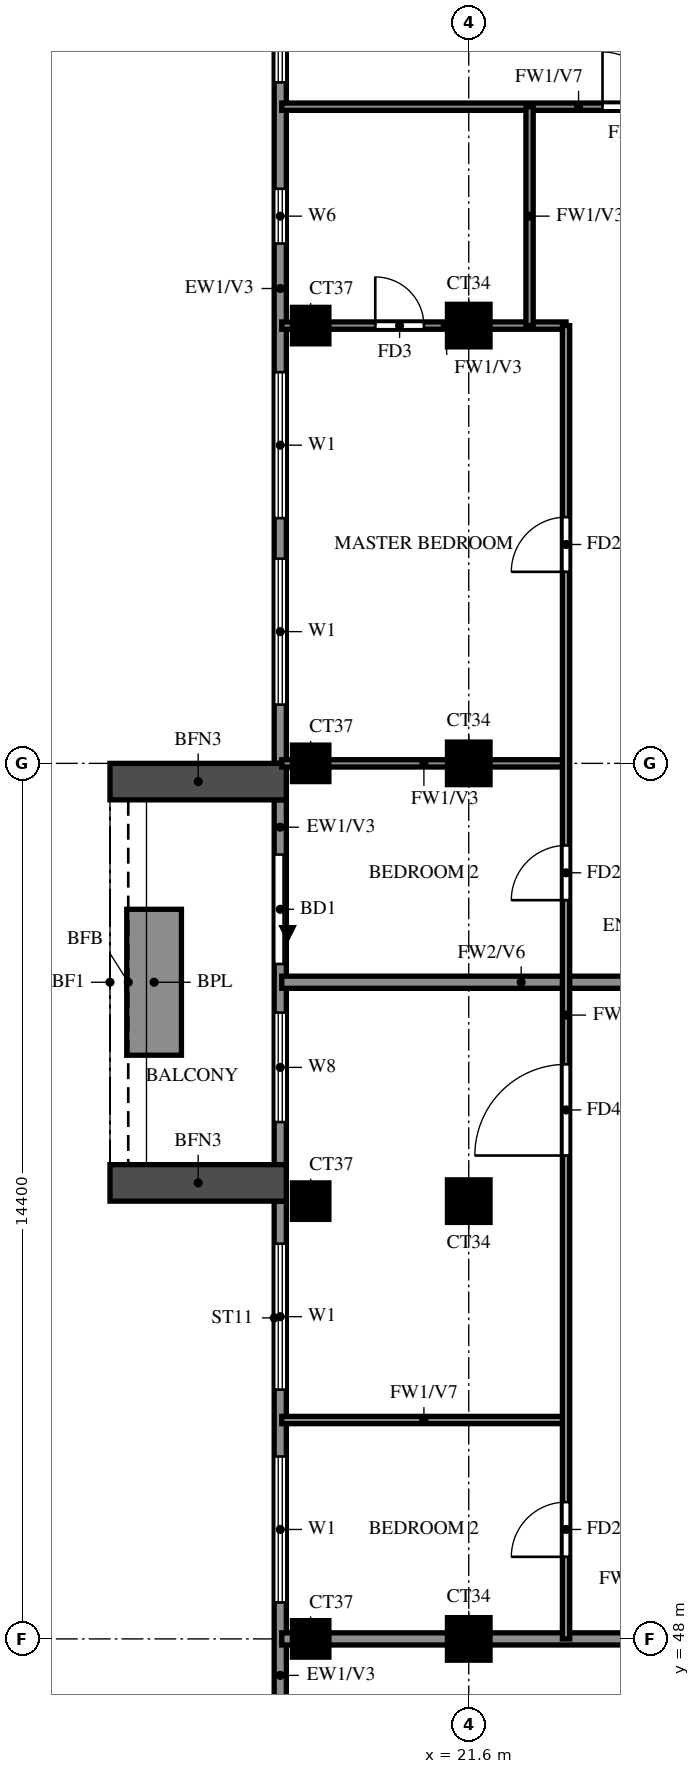
"""IFC4 building model, lengths in metres.
Left out: names, types, materials, properties, quantities, classifications, styles, units other than length and angle.
Written with IfcOpenShell. Run it as: python <this file> out.ifc"""

import sys

from ifc_helpers import new_model, si_unit, direction, frame, frame_2d, origin, origin_2d, place, context, subcontext, project, spatial, rectangle, extrude, source, transform, mapped, element, fill, save


model = new_model("IFC4")
c1 = context("Model", 3, precision=1e-05, world=origin(), true_north=direction((0.0, 1.0)))
c2 = subcontext(c1, "Body", "Model", "MODEL_VIEW")
j1 = project(units=[si_unit("LENGTHUNIT", "METRE"), si_unit("PLANEANGLEUNIT", "RADIAN")], contexts=[c1])
p1 = place(None, origin())
s1 = spatial("IfcSite", under=j1, at=p1, CompositionType="ELEMENT")
p2 = place(p1, origin())
s2 = spatial("IfcBuilding", under=s1, at=p2, CompositionType="ELEMENT")
p3 = place(p2, frame((0.0, 0.0, 260.5)))
s3 = spatial("IfcBuildingStorey", under=s2, at=p3, CompositionType="ELEMENT", Elevation=260.5)
m1 = source(origin(), c2, "Body", "SweptSolid", [
    extrude(rectangle(XDim=0.6, YDim=0.6, at=origin_2d()), origin(), (0.0, 0.0, 1.0), 3.22),
])
p4 = place(p3, frame((19.0, 48.0, 0.0), z_axis=(0.0, 0.0, 1.0), x_axis=(1.0, 0.0, 0.0)))
e1 = element("IfcColumn", 1, at=p4, inside=s3, PredefinedType="COLUMN", context=c2, shape_type="MappedRepresentation", body=[
    mapped(m1, transform((0.0, 0.0, 0.0))),
])
m2 = source(origin(), c2, "Body", "SweptSolid", [
    extrude(rectangle(XDim=0.7, YDim=0.7, at=origin_2d()), origin(), (0.0, 0.0, 1.0), 3.22),
])
p5 = place(p3, frame((21.6, 48.0, 0.0), z_axis=(0.0, 0.0, 1.0), x_axis=(1.0, 0.0, 0.0)))
e2 = element("IfcColumn", 2, at=p5, inside=s3, PredefinedType="COLUMN", context=c2, shape_type="MappedRepresentation", body=[
    mapped(m2, transform((0.0, 0.0, 0.0))),
])
p6 = place(p3, frame((19.0, 55.2, 0.0), z_axis=(0.0, 0.0, 1.0), x_axis=(1.0, 0.0, 0.0)))
e3 = element("IfcColumn", 3, at=p6, inside=s3, PredefinedType="COLUMN", context=c2, shape_type="MappedRepresentation", body=[
    mapped(m1, transform((0.0, 0.0, 0.0))),
])
p7 = place(p3, frame((21.6, 55.2, 0.0), z_axis=(0.0, 0.0, 1.0), x_axis=(1.0, 0.0, 0.0)))
e4 = element("IfcColumn", 4, at=p7, inside=s3, PredefinedType="COLUMN", context=c2, shape_type="MappedRepresentation", body=[
    mapped(m2, transform((0.0, 0.0, 0.0))),
])
p8 = place(p3, frame((19.0, 62.4, 0.0), z_axis=(0.0, 0.0, 1.0), x_axis=(1.0, 0.0, 0.0)))
e5 = element("IfcColumn", 5, at=p8, inside=s3, PredefinedType="COLUMN", context=c2, shape_type="MappedRepresentation", body=[
    mapped(m1, transform((0.0, 0.0, 0.0))),
])
p9 = place(p3, frame((21.6, 62.4, 0.0), z_axis=(0.0, 0.0, 1.0), x_axis=(1.0, 0.0, 0.0)))
e6 = element("IfcColumn", 6, at=p9, inside=s3, PredefinedType="COLUMN", context=c2, shape_type="MappedRepresentation", body=[
    mapped(m2, transform((0.0, 0.0, 0.0))),
])
p10 = place(p3, frame((19.0, 69.6, 0.0), z_axis=(0.0, 0.0, 1.0), x_axis=(1.0, 0.0, 0.0)))
e7 = element("IfcColumn", 7, at=p10, inside=s3, PredefinedType="COLUMN", context=c2, shape_type="MappedRepresentation", body=[
    mapped(m1, transform((0.0, 0.0, 0.0))),
])
p11 = place(p3, frame((21.6, 69.6, 0.0), z_axis=(0.0, 0.0, 1.0), x_axis=(1.0, 0.0, 0.0)))
e8 = element("IfcColumn", 8, at=p11, inside=s3, PredefinedType="COLUMN", context=c2, shape_type="MappedRepresentation", body=[
    mapped(m2, transform((0.0, 0.0, 0.0))),
])
p12 = place(p3, frame((18.5, 76.6, 0.0), z_axis=(0.0, 0.0, 1.0), x_axis=(0.0, -1.0, 0.0)))
e9 = element("IfcWall", 9, at=p12, inside=s3, PredefinedType="SOLIDWALL", context=c2, shape_type="SweptSolid", body=[
    extrude(rectangle(XDim=14.2, YDim=0.2, at=frame_2d((7.1, 0.0))), origin(), (0.0, 0.0, 1.0), 3.22),
])
p13 = place(p12, frame((7.767, 0.0, 0.6)))
e10 = element("IfcOpeningElement", 10, at=p13, cuts=e9, PredefinedType="OPENING", context=c2, shape_type="SweptSolid", body=[
    extrude(rectangle(XDim=2.4, YDim=2.4, at=frame_2d((1.2, 1.2))), frame((0.0, 0.11, 0.0), z_axis=(0.0, -1.0, 0.0), x_axis=(1.0, 0.0, 0.0)), (0.0, 0.0, 1.0), 0.22),
])
p14 = place(p12, frame((10.833, 0.0, 0.6)))
e11 = element("IfcOpeningElement", 11, at=p14, cuts=e9, PredefinedType="OPENING", context=c2, shape_type="SweptSolid", body=[
    extrude(rectangle(XDim=2.4, YDim=2.4, at=frame_2d((1.2, 1.2))), frame((0.0, 0.11, 0.0), z_axis=(0.0, -1.0, 0.0), x_axis=(1.0, 0.0, 0.0)), (0.0, 0.0, 1.0), 0.22),
])
p15 = place(p12, frame((4.75, 0.0, 1.5)))
e12 = element("IfcOpeningElement", 12, at=p15, cuts=e9, PredefinedType="OPENING", context=c2, shape_type="SweptSolid", body=[
    extrude(rectangle(XDim=0.9, YDim=0.9, at=frame_2d((0.45, 0.45))), frame((0.0, 0.11, 0.0), z_axis=(0.0, -1.0, 0.0), x_axis=(1.0, 0.0, 0.0)), (0.0, 0.0, 1.0), 0.22),
])
p16 = place(p12, frame((0.6, 0.0, 0.6)))
e13 = element("IfcOpeningElement", 13, at=p16, cuts=e9, PredefinedType="OPENING", context=c2, shape_type="SweptSolid", body=[
    extrude(rectangle(XDim=2.4, YDim=2.4, at=frame_2d((1.2, 1.2))), frame((0.0, 0.11, 0.0), z_axis=(0.0, -1.0, 0.0), x_axis=(1.0, 0.0, 0.0)), (0.0, 0.0, 1.0), 0.22),
])
p17 = place(p3, frame((18.5, 61.8, 0.0), z_axis=(0.0, 0.0, 1.0), x_axis=(0.0, -1.0, 0.0)))
e14 = element("IfcWall", 14, at=p17, inside=s3, PredefinedType="SOLIDWALL", context=c2, shape_type="SweptSolid", body=[
    extrude(rectangle(XDim=6.0, YDim=0.2, at=frame_2d((3.0, 0.0))), origin(), (0.0, 0.0, 1.0), 3.22),
])
p18 = place(p17, frame((0.9, 0.0, 0.0)))
e15 = element("IfcOpeningElement", 15, at=p18, cuts=e14, PredefinedType="OPENING", context=c2, shape_type="SweptSolid", body=[
    extrude(rectangle(XDim=1.8, YDim=2.4, at=frame_2d((0.9, 1.2))), frame((0.0, 0.11, 0.0), z_axis=(0.0, -1.0, 0.0), x_axis=(1.0, 0.0, 0.0)), (0.0, 0.0, 1.0), 0.22),
])
p19 = place(p17, frame((3.5, 0.0, 0.6)))
e16 = element("IfcOpeningElement", 16, at=p19, cuts=e14, PredefinedType="OPENING", context=c2, shape_type="SweptSolid", body=[
    extrude(rectangle(XDim=1.8, YDim=2.4, at=frame_2d((0.9, 1.2))), frame((0.0, 0.11, 0.0), z_axis=(0.0, -1.0, 0.0), x_axis=(1.0, 0.0, 0.0)), (0.0, 0.0, 1.0), 0.22),
])
p20 = place(p3, frame((18.5, 55.2, 0.0), z_axis=(0.0, 0.0, 1.0), x_axis=(0.0, -1.0, 0.0)))
e17 = element("IfcWall", 17, at=p20, inside=s3, PredefinedType="SOLIDWALL", context=c2, shape_type="SweptSolid", body=[
    extrude(rectangle(XDim=12.0, YDim=0.2, at=frame_2d((6.0, 0.0))), origin(), (0.0, 0.0, 1.0), 3.22),
])
p21 = place(p20, frame((8.3, 0.0, 0.6)))
e18 = element("IfcOpeningElement", 18, at=p21, cuts=e17, PredefinedType="OPENING", context=c2, shape_type="SweptSolid", body=[
    extrude(rectangle(XDim=2.4, YDim=2.4, at=frame_2d((1.2, 1.2))), frame((0.0, 0.11, 0.0), z_axis=(0.0, -1.0, 0.0), x_axis=(1.0, 0.0, 0.0)), (0.0, 0.0, 1.0), 0.22),
])
p22 = place(p20, frame((4.2, 0.0, 0.6)))
e19 = element("IfcOpeningElement", 19, at=p22, cuts=e17, PredefinedType="OPENING", context=c2, shape_type="SweptSolid", body=[
    extrude(rectangle(XDim=2.4, YDim=2.4, at=frame_2d((1.2, 1.2))), frame((0.0, 0.11, 0.0), z_axis=(0.0, -1.0, 0.0), x_axis=(1.0, 0.0, 0.0)), (0.0, 0.0, 1.0), 0.22),
])
p23 = place(p20, frame((0.7, 0.0, 0.6)))
e20 = element("IfcOpeningElement", 20, at=p23, cuts=e17, PredefinedType="OPENING", context=c2, shape_type="SweptSolid", body=[
    extrude(rectangle(XDim=2.4, YDim=2.4, at=frame_2d((1.2, 1.2))), frame((0.0, 0.11, 0.0), z_axis=(0.0, -1.0, 0.0), x_axis=(1.0, 0.0, 0.0)), (0.0, 0.0, 1.0), 0.22),
])
for number, where, z_axis, x_axis in (
    (21, (18.6, 62.1, 0.0), (0.0, 0.0, 1.0), (-1.0, 0.0, 0.0)),
    (22, (18.6, 55.5, 0.0), (0.0, 0.0, 1.0), (-1.0, 0.0, 0.0)),
):
    element("IfcWall", number, at=place(p3, frame(where, z_axis=z_axis, x_axis=x_axis)), inside=s3, PredefinedType="SOLIDWALL", context=c2, shape_type="SweptSolid", body=[
        extrude(rectangle(XDim=2.9, YDim=0.6, at=frame_2d((1.45, 0.0))), origin(), (0.0, 0.0, 1.0), 2.85),
    ])
p24 = place(p3, frame((16.425, 60.0, 0.0), z_axis=(0.0, 0.0, 1.0), x_axis=(0.0, -1.0, 0.0)))
e23 = element("IfcWall", 23, at=p24, inside=s3, PredefinedType="SOLIDWALL", context=c2, shape_type="SweptSolid", body=[
    extrude(rectangle(XDim=2.4, YDim=0.9, at=frame_2d((1.2, 0.0))), origin(), (0.0, 0.0, 1.0), 0.9),
])
p25 = place(p3, frame((18.525, 48.0, 0.0), z_axis=(0.0, 0.0, 1.0), x_axis=(1.0, 0.0, 0.0)))
e24 = element("IfcWall", 24, at=p25, inside=s3, PredefinedType="SOLIDWALL", context=c2, shape_type="SweptSolid", body=[
    extrude(rectangle(XDim=15.075, YDim=0.2, at=frame_2d((7.538, 0.0))), origin(), (0.0, 0.0, 1.0), 3.22),
])
p26 = place(p3, frame((18.525, 58.8, 0.0), z_axis=(0.0, 0.0, 1.0), x_axis=(1.0, 0.0, 0.0)))
e25 = element("IfcWall", 25, at=p26, inside=s3, PredefinedType="SOLIDWALL", context=c2, shape_type="SweptSolid", body=[
    extrude(rectangle(XDim=7.875, YDim=0.2, at=frame_2d((3.938, 0.0))), origin(), (0.0, 0.0, 1.0), 2.32),
])
p27 = place(p3, frame((18.525, 51.6, 0.0), z_axis=(0.0, 0.0, 1.0), x_axis=(1.0, 0.0, 0.0)))
e26 = element("IfcWall", 26, at=p27, inside=s3, PredefinedType="PARTITIONING", context=c2, shape_type="SweptSolid", body=[
    extrude(rectangle(XDim=4.675, YDim=0.12, at=frame_2d((2.337, 0.0))), origin(), (0.0, 0.0, 1.0), 2.32),
])
p28 = place(p3, frame((18.525, 62.4, 0.0), z_axis=(0.0, 0.0, 1.0), x_axis=(1.0, 0.0, 0.0)))
e27 = element("IfcWall", 27, at=p28, inside=s3, PredefinedType="PARTITIONING", context=c2, shape_type="SweptSolid", body=[
    extrude(rectangle(XDim=4.675, YDim=0.12, at=frame_2d((2.337, 0.0))), origin(), (0.0, 0.0, 1.0), 3.22),
])
p29 = place(p3, frame((18.525, 69.6, 0.0), z_axis=(0.0, 0.0, 1.0), x_axis=(1.0, 0.0, 0.0)))
e28 = element("IfcWall", 28, at=p29, inside=s3, PredefinedType="PARTITIONING", context=c2, shape_type="SweptSolid", body=[
    extrude(rectangle(XDim=4.675, YDim=0.12, at=frame_2d((2.337, 0.0))), origin(), (0.0, 0.0, 1.0), 3.22),
])
p30 = place(p29, frame((1.538, 0.0, 0.0)))
e29 = element("IfcOpeningElement", 29, at=p30, cuts=e28, PredefinedType="OPENING", context=c2, shape_type="SweptSolid", body=[
    extrude(rectangle(XDim=0.8, YDim=2.1, at=frame_2d((0.4, 1.05))), frame((0.0, 0.07, 0.0), z_axis=(0.0, -1.0, 0.0), x_axis=(1.0, 0.0, 0.0)), (0.0, 0.0, 1.0), 0.14),
])
p31 = place(p3, frame((18.525, 73.2, 0.0), z_axis=(0.0, 0.0, 1.0), x_axis=(1.0, 0.0, 0.0)))
e30 = element("IfcWall", 30, at=p31, inside=s3, PredefinedType="PARTITIONING", context=c2, shape_type="SweptSolid", body=[
    extrude(rectangle(XDim=10.275, YDim=0.12, at=frame_2d((5.138, 0.0))), origin(), (0.0, 0.0, 1.0), 2.32),
])
p32 = place(p31, frame((5.275, 0.0, 0.0)))
e31 = element("IfcOpeningElement", 31, at=p32, cuts=e30, PredefinedType="OPENING", context=c2, shape_type="SweptSolid", body=[
    extrude(rectangle(XDim=0.9, YDim=2.1, at=frame_2d((0.45, 1.05))), frame((0.0, 0.07, 0.0), z_axis=(0.0, -1.0, 0.0), x_axis=(1.0, 0.0, 0.0)), (0.0, 0.0, 1.0), 0.14),
])
p33 = place(p3, frame((22.6, 69.6, 0.0), z_axis=(0.0, 0.0, 1.0), x_axis=(0.0, 1.0, 0.0)))
e32 = element("IfcWall", 32, at=p33, inside=s3, PredefinedType="PARTITIONING", context=c2, shape_type="SweptSolid", body=[
    extrude(rectangle(XDim=3.6, YDim=0.12, at=frame_2d((1.8, 0.0))), origin(), (0.0, 0.0, 1.0), 3.22),
])
p34 = place(p3, frame((23.2, 48.0, 0.0), z_axis=(0.0, 0.0, 1.0), x_axis=(0.0, 1.0, 0.0)))
e33 = element("IfcWall", 33, at=p34, inside=s3, PredefinedType="PARTITIONING", context=c2, shape_type="SweptSolid", body=[
    extrude(rectangle(XDim=21.6, YDim=0.12, at=frame_2d((10.8, 0.0))), origin(), (0.0, 0.0, 1.0), 3.22),
])
p35 = place(p34, frame((1.35, 0.0, 0.0)))
e34 = element("IfcOpeningElement", 34, at=p35, cuts=e33, PredefinedType="OPENING", context=c2, shape_type="SweptSolid", body=[
    extrude(rectangle(XDim=0.9, YDim=2.1, at=frame_2d((0.45, 1.05))), frame((0.0, 0.07, 0.0), z_axis=(0.0, -1.0, 0.0), x_axis=(1.0, 0.0, 0.0)), (0.0, 0.0, 1.0), 0.14),
])
p36 = place(p34, frame((7.95, 0.0, 0.0)))
e35 = element("IfcOpeningElement", 35, at=p36, cuts=e33, PredefinedType="OPENING", context=c2, shape_type="SweptSolid", body=[
    extrude(rectangle(XDim=1.5, YDim=2.1, at=frame_2d((0.75, 1.05))), frame((0.0, 0.07, 0.0), z_axis=(0.0, -1.0, 0.0), x_axis=(1.0, 0.0, 0.0)), (0.0, 0.0, 1.0), 0.14),
])
p37 = place(p34, frame((12.15, 0.0, 0.0)))
e36 = element("IfcOpeningElement", 36, at=p37, cuts=e33, PredefinedType="OPENING", context=c2, shape_type="SweptSolid", body=[
    extrude(rectangle(XDim=0.9, YDim=2.1, at=frame_2d((0.45, 1.05))), frame((0.0, 0.07, 0.0), z_axis=(0.0, -1.0, 0.0), x_axis=(1.0, 0.0, 0.0)), (0.0, 0.0, 1.0), 0.14),
])
p38 = place(p34, frame((17.55, 0.0, 0.0)))
e37 = element("IfcOpeningElement", 37, at=p38, cuts=e33, PredefinedType="OPENING", context=c2, shape_type="SweptSolid", body=[
    extrude(rectangle(XDim=0.9, YDim=2.1, at=frame_2d((0.45, 1.05))), frame((0.0, 0.07, 0.0), z_axis=(0.0, -1.0, 0.0), x_axis=(1.0, 0.0, 0.0)), (0.0, 0.0, 1.0), 0.14),
])
p39 = place(p13, origin())
e38 = element("IfcWindow", 38, at=p39, inside=s3, PartitioningType="DOUBLE_PANEL_VERTICAL", PredefinedType="WINDOW", context=c2, shape_type="SweptSolid", body=[
    extrude(rectangle(XDim=2.4, YDim=2.4, at=frame_2d((1.2, 1.2))), frame((0.0, 0.03, 0.0), z_axis=(0.0, -1.0, 0.0), x_axis=(1.0, 0.0, 0.0)), (0.0, 0.0, 1.0), 0.06),
])
fill(e10, e38)
p40 = place(p14, origin())
e39 = element("IfcWindow", 39, at=p40, inside=s3, PartitioningType="DOUBLE_PANEL_VERTICAL", PredefinedType="WINDOW", context=c2, shape_type="SweptSolid", body=[
    extrude(rectangle(XDim=2.4, YDim=2.4, at=frame_2d((1.2, 1.2))), frame((0.0, 0.03, 0.0), z_axis=(0.0, -1.0, 0.0), x_axis=(1.0, 0.0, 0.0)), (0.0, 0.0, 1.0), 0.06),
])
fill(e11, e39)
p41 = place(p15, origin())
e40 = element("IfcWindow", 40, at=p41, inside=s3, PartitioningType="SINGLE_PANEL", PredefinedType="WINDOW", context=c2, shape_type="SweptSolid", body=[
    extrude(rectangle(XDim=0.9, YDim=0.9, at=frame_2d((0.45, 0.45))), frame((0.0, 0.03, 0.0), z_axis=(0.0, -1.0, 0.0), x_axis=(1.0, 0.0, 0.0)), (0.0, 0.0, 1.0), 0.06),
])
fill(e12, e40)
p42 = place(p16, origin())
e41 = element("IfcWindow", 41, at=p42, inside=s3, PartitioningType="DOUBLE_PANEL_VERTICAL", PredefinedType="WINDOW", context=c2, shape_type="SweptSolid", body=[
    extrude(rectangle(XDim=2.4, YDim=2.4, at=frame_2d((1.2, 1.2))), frame((0.0, 0.03, 0.0), z_axis=(0.0, -1.0, 0.0), x_axis=(1.0, 0.0, 0.0)), (0.0, 0.0, 1.0), 0.06),
])
fill(e13, e41)
p43 = place(p18, origin())
e42 = element("IfcDoor", 42, at=p43, inside=s3, OperationType="DOUBLE_DOOR_SLIDING", PredefinedType="DOOR", context=c2, shape_type="SweptSolid", body=[
    extrude(rectangle(XDim=1.8, YDim=2.4, at=frame_2d((0.9, 1.2))), frame((0.0, 0.025, 0.0), z_axis=(0.0, -1.0, 0.0), x_axis=(1.0, 0.0, 0.0)), (0.0, 0.0, 1.0), 0.05),
])
fill(e15, e42)
p44 = place(p19, origin())
e43 = element("IfcWindow", 43, at=p44, inside=s3, PartitioningType="DOUBLE_PANEL_VERTICAL", PredefinedType="WINDOW", context=c2, shape_type="SweptSolid", body=[
    extrude(rectangle(XDim=1.8, YDim=2.4, at=frame_2d((0.9, 1.2))), frame((0.0, 0.03, 0.0), z_axis=(0.0, -1.0, 0.0), x_axis=(1.0, 0.0, 0.0)), (0.0, 0.0, 1.0), 0.06),
])
fill(e16, e43)
p45 = place(p22, origin())
e44 = element("IfcWindow", 44, at=p45, inside=s3, PartitioningType="DOUBLE_PANEL_VERTICAL", PredefinedType="WINDOW", context=c2, shape_type="SweptSolid", body=[
    extrude(rectangle(XDim=2.4, YDim=2.4, at=frame_2d((1.2, 1.2))), frame((0.0, 0.03, 0.0), z_axis=(0.0, -1.0, 0.0), x_axis=(1.0, 0.0, 0.0)), (0.0, 0.0, 1.0), 0.06),
])
fill(e19, e44)
p46 = place(p23, origin())
e45 = element("IfcWindow", 45, at=p46, inside=s3, PartitioningType="DOUBLE_PANEL_VERTICAL", PredefinedType="WINDOW", context=c2, shape_type="SweptSolid", body=[
    extrude(rectangle(XDim=2.4, YDim=2.4, at=frame_2d((1.2, 1.2))), frame((0.0, 0.03, 0.0), z_axis=(0.0, -1.0, 0.0), x_axis=(1.0, 0.0, 0.0)), (0.0, 0.0, 1.0), 0.06),
])
fill(e20, e45)
p47 = place(p35, origin())
e46 = element("IfcDoor", 46, at=p47, inside=s3, OperationType="SINGLE_SWING_LEFT", PredefinedType="DOOR", context=c2, shape_type="SweptSolid", body=[
    extrude(rectangle(XDim=0.9, YDim=2.1, at=frame_2d((0.45, 1.05))), frame((0.0, 0.025, 0.0), z_axis=(0.0, -1.0, 0.0), x_axis=(1.0, 0.0, 0.0)), (0.0, 0.0, 1.0), 0.05),
])
fill(e34, e46)
p48 = place(p36, origin())
e47 = element("IfcDoor", 47, at=p48, inside=s3, OperationType="SINGLE_SWING_LEFT", PredefinedType="DOOR", context=c2, shape_type="SweptSolid", body=[
    extrude(rectangle(XDim=1.5, YDim=2.1, at=frame_2d((0.75, 1.05))), frame((0.0, 0.025, 0.0), z_axis=(0.0, -1.0, 0.0), x_axis=(1.0, 0.0, 0.0)), (0.0, 0.0, 1.0), 0.05),
])
fill(e35, e47)
p49 = place(p37, origin())
e48 = element("IfcDoor", 48, at=p49, inside=s3, OperationType="SINGLE_SWING_LEFT", PredefinedType="DOOR", context=c2, shape_type="SweptSolid", body=[
    extrude(rectangle(XDim=0.9, YDim=2.1, at=frame_2d((0.45, 1.05))), frame((0.0, 0.025, 0.0), z_axis=(0.0, -1.0, 0.0), x_axis=(1.0, 0.0, 0.0)), (0.0, 0.0, 1.0), 0.05),
])
fill(e36, e48)
p50 = place(p38, origin())
e49 = element("IfcDoor", 49, at=p50, inside=s3, OperationType="SINGLE_SWING_LEFT", PredefinedType="DOOR", context=c2, shape_type="SweptSolid", body=[
    extrude(rectangle(XDim=0.9, YDim=2.1, at=frame_2d((0.45, 1.05))), frame((0.0, 0.025, 0.0), z_axis=(0.0, -1.0, 0.0), x_axis=(1.0, 0.0, 0.0)), (0.0, 0.0, 1.0), 0.05),
])
fill(e37, e49)
p51 = place(p30, origin())
e50 = element("IfcDoor", 50, at=p51, inside=s3, OperationType="SINGLE_SWING_LEFT", PredefinedType="DOOR", context=c2, shape_type="SweptSolid", body=[
    extrude(rectangle(XDim=0.8, YDim=2.1, at=frame_2d((0.4, 1.05))), frame((0.0, 0.025, 0.0), z_axis=(0.0, -1.0, 0.0), x_axis=(1.0, 0.0, 0.0)), (0.0, 0.0, 1.0), 0.05),
])
fill(e29, e50)
p52 = place(p32, origin())
e51 = element("IfcDoor", 51, at=p52, inside=s3, OperationType="SINGLE_SWING_LEFT", PredefinedType="DOOR", context=c2, shape_type="SweptSolid", body=[
    extrude(rectangle(XDim=0.9, YDim=2.1, at=frame_2d((0.45, 1.05))), frame((0.0, 0.025, 0.0), z_axis=(0.0, -1.0, 0.0), x_axis=(1.0, 0.0, 0.0)), (0.0, 0.0, 1.0), 0.05),
])
fill(e31, e51)
save(model, sys.argv[1])
